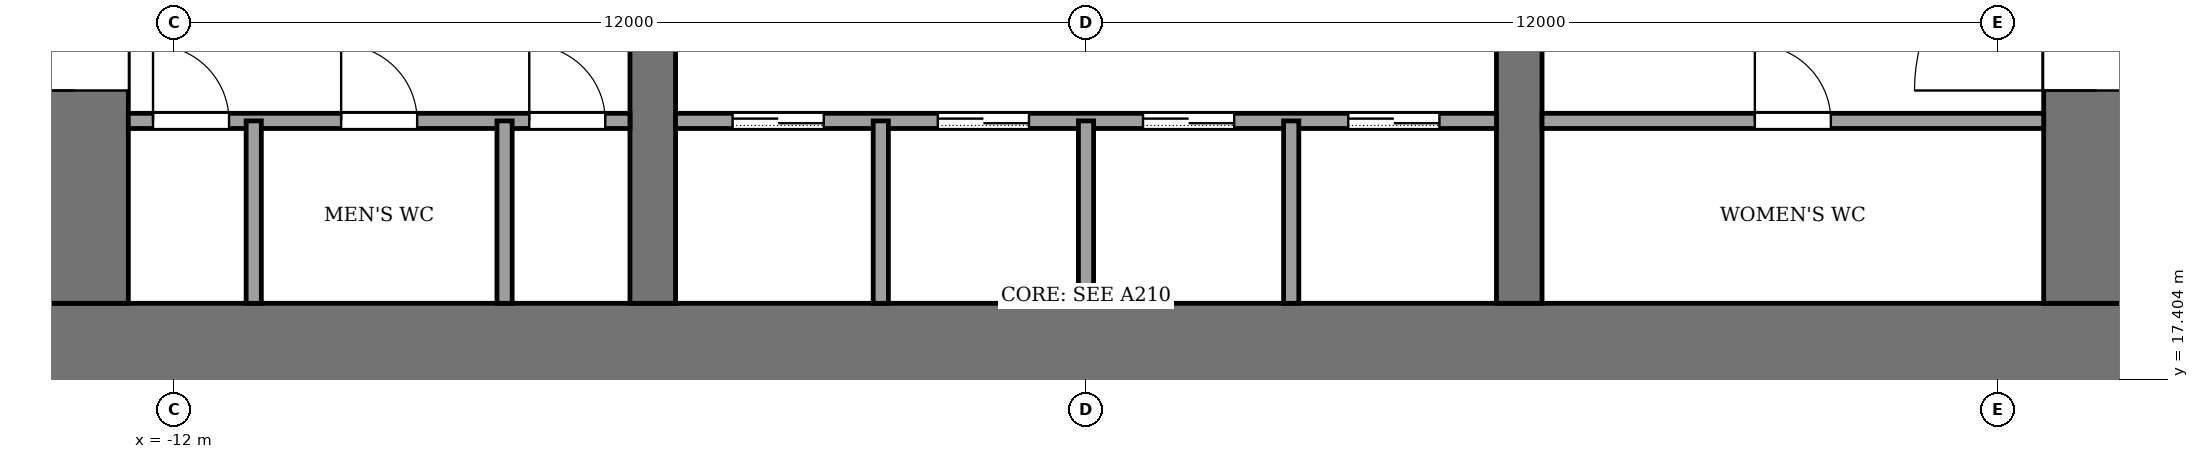
"""IFC4 building model, lengths in metres.
Left out: names, types, materials, properties, quantities, classifications, styles, units other than length and angle.
Written with IfcOpenShell. Run it as: python <this file> out.ifc"""

import sys

from ifc_helpers import new_model, si_unit, direction, frame, frame_2d, origin, place, context, subcontext, project, spatial, rectangle, extrude, element, fill, save


model = new_model("IFC4")
c1 = context("Model", 3, precision=1e-05, world=origin(), true_north=direction((0.0, 1.0)))
c2 = subcontext(c1, "Body", "Model", "MODEL_VIEW")
j1 = project(units=[si_unit("LENGTHUNIT", "METRE"), si_unit("PLANEANGLEUNIT", "RADIAN")], contexts=[c1])
p1 = place(None, origin())
s1 = spatial("IfcSite", under=j1, at=p1, CompositionType="ELEMENT")
p2 = place(p1, origin())
s2 = spatial("IfcBuilding", under=s1, at=p2, CompositionType="ELEMENT")
p3 = place(p2, frame((0.0, 0.0, 54.0)))
s3 = spatial("IfcBuildingStorey", under=s2, at=p3, CompositionType="ELEMENT", Elevation=54.0)
p4 = place(p3, frame((-14.0, 17.7, -0.13), z_axis=(0.0, 0.0, 1.0), x_axis=(1.0, 0.0, 0.0)))
e1 = element("IfcWall", 1, at=p4, inside=s3, PredefinedType="SHEAR", context=c2, shape_type="SweptSolid", body=[
    extrude(rectangle(XDim=28.0, YDim=1.4, at=frame_2d((14.0, 0.0))), origin(), (0.0, 0.0, 1.0), 3.88),
])
p5 = place(p3, frame((-13.3, 18.4, -0.13), z_axis=(0.0, 0.0, 1.0), x_axis=(0.0, 1.0, 0.0)))
e2 = element("IfcWall", 2, at=p5, inside=s3, PredefinedType="SHEAR", context=c2, shape_type="SweptSolid", body=[
    extrude(rectangle(XDim=19.2, YDim=1.4, at=frame_2d((9.6, 0.0))), origin(), (0.0, 0.0, 1.0), 3.88),
])
p6 = place(p5, frame((2.8, 0.0, 0.13)))
e3 = element("IfcOpeningElement", 3, at=p6, cuts=e2, PredefinedType="OPENING", context=c2, shape_type="SweptSolid", body=[
    extrude(rectangle(XDim=2.4, YDim=2.4, at=frame_2d((1.2, 1.2))), frame((0.0, 0.71, 0.0), z_axis=(0.0, -1.0, 0.0), x_axis=(1.0, 0.0, 0.0)), (0.0, 0.0, 1.0), 1.42),
])
p7 = place(p5, frame((13.4, 0.0, 0.13)))
e4 = element("IfcOpeningElement", 4, at=p7, cuts=e2, PredefinedType="OPENING", context=c2, shape_type="SweptSolid", body=[
    extrude(rectangle(XDim=1.4, YDim=2.2, at=frame_2d((0.7, 1.1))), frame((0.0, 0.71, 0.0), z_axis=(0.0, -1.0, 0.0), x_axis=(1.0, 0.0, 0.0)), (0.0, 0.0, 1.0), 1.42),
])
p8 = place(p3, frame((13.3, 18.4, -0.13), z_axis=(0.0, 0.0, 1.0), x_axis=(0.0, 1.0, 0.0)))
e5 = element("IfcWall", 5, at=p8, inside=s3, PredefinedType="SHEAR", context=c2, shape_type="SweptSolid", body=[
    extrude(rectangle(XDim=19.2, YDim=1.4, at=frame_2d((9.6, 0.0))), origin(), (0.0, 0.0, 1.0), 3.88),
])
p9 = place(p8, frame((2.8, 0.0, 0.13)))
e6 = element("IfcOpeningElement", 6, at=p9, cuts=e5, PredefinedType="OPENING", context=c2, shape_type="SweptSolid", body=[
    extrude(rectangle(XDim=2.4, YDim=2.4, at=frame_2d((1.2, 1.2))), frame((0.0, 0.71, 0.0), z_axis=(0.0, -1.0, 0.0), x_axis=(1.0, 0.0, 0.0)), (0.0, 0.0, 1.0), 1.42),
])
p10 = place(p8, frame((13.3, 0.0, 0.13)))
e7 = element("IfcOpeningElement", 7, at=p10, cuts=e5, PredefinedType="OPENING", context=c2, shape_type="SweptSolid", body=[
    extrude(rectangle(XDim=2.4, YDim=2.4, at=frame_2d((1.2, 1.2))), frame((0.0, 0.71, 0.0), z_axis=(0.0, -1.0, 0.0), x_axis=(1.0, 0.0, 0.0)), (0.0, 0.0, 1.0), 1.42),
])
p11 = place(p3, frame((-5.7, 18.4, -0.13), z_axis=(0.0, 0.0, 1.0), x_axis=(0.0, 1.0, 0.0)))
e8 = element("IfcWall", 8, at=p11, inside=s3, PredefinedType="SHEAR", context=c2, shape_type="SweptSolid", body=[
    extrude(rectangle(XDim=19.2, YDim=0.6, at=frame_2d((9.6, 0.0))), origin(), (0.0, 0.0, 1.0), 3.88),
])
p12 = place(p11, frame((8.35, 0.0, 0.13)))
e9 = element("IfcOpeningElement", 9, at=p12, cuts=e8, PredefinedType="OPENING", context=c2, shape_type="SweptSolid", body=[
    extrude(rectangle(XDim=0.9, YDim=2.1, at=frame_2d((0.45, 1.05))), frame((0.0, 0.31, 0.0), z_axis=(0.0, -1.0, 0.0), x_axis=(1.0, 0.0, 0.0)), (0.0, 0.0, 1.0), 0.62),
])
p13 = place(p3, frame((5.7, 18.4, -0.13), z_axis=(0.0, 0.0, 1.0), x_axis=(0.0, 1.0, 0.0)))
e10 = element("IfcWall", 10, at=p13, inside=s3, PredefinedType="SHEAR", context=c2, shape_type="SweptSolid", body=[
    extrude(rectangle(XDim=19.2, YDim=0.6, at=frame_2d((9.6, 0.0))), origin(), (0.0, 0.0, 1.0), 3.88),
])
p14 = place(p13, frame((8.35, 0.0, 0.13)))
e11 = element("IfcOpeningElement", 11, at=p14, cuts=e10, PredefinedType="OPENING", context=c2, shape_type="SweptSolid", body=[
    extrude(rectangle(XDim=0.9, YDim=2.1, at=frame_2d((0.45, 1.05))), frame((0.0, 0.31, 0.0), z_axis=(0.0, -1.0, 0.0), x_axis=(1.0, 0.0, 0.0)), (0.0, 0.0, 1.0), 0.62),
])
p15 = place(p13, frame((13.3, 0.0, 0.13)))
e12 = element("IfcOpeningElement", 12, at=p15, cuts=e10, PredefinedType="OPENING", context=c2, shape_type="SweptSolid", body=[
    extrude(rectangle(XDim=2.4, YDim=2.4, at=frame_2d((1.2, 1.2))), frame((0.0, 0.31, 0.0), z_axis=(0.0, -1.0, 0.0), x_axis=(1.0, 0.0, 0.0)), (0.0, 0.0, 1.0), 0.62),
])
p16 = place(p3, frame((-12.6, 20.8, 0.0), z_axis=(0.0, 0.0, 1.0), x_axis=(1.0, 0.0, 0.0)))
e13 = element("IfcWall", 13, at=p16, inside=s3, PredefinedType="PARTITIONING", context=c2, shape_type="SweptSolid", body=[
    extrude(rectangle(XDim=6.6, YDim=0.2, at=frame_2d((3.3, 0.0))), origin(), (0.0, 0.0, 1.0), 3.75),
])
p17 = place(p16, frame((0.325, 0.0, 0.0)))
e14 = element("IfcOpeningElement", 14, at=p17, cuts=e13, PredefinedType="OPENING", context=c2, shape_type="SweptSolid", body=[
    extrude(rectangle(XDim=1.0, YDim=2.1, at=frame_2d((0.5, 1.05))), frame((0.0, 0.11, 0.0), z_axis=(0.0, -1.0, 0.0), x_axis=(1.0, 0.0, 0.0)), (0.0, 0.0, 1.0), 0.22),
])
p18 = place(p16, frame((2.8, 0.0, 0.0)))
e15 = element("IfcOpeningElement", 15, at=p18, cuts=e13, PredefinedType="OPENING", context=c2, shape_type="SweptSolid", body=[
    extrude(rectangle(XDim=1.0, YDim=2.1, at=frame_2d((0.5, 1.05))), frame((0.0, 0.11, 0.0), z_axis=(0.0, -1.0, 0.0), x_axis=(1.0, 0.0, 0.0)), (0.0, 0.0, 1.0), 0.22),
])
p19 = place(p16, frame((5.275, 0.0, 0.0)))
e16 = element("IfcOpeningElement", 16, at=p19, cuts=e13, PredefinedType="OPENING", context=c2, shape_type="SweptSolid", body=[
    extrude(rectangle(XDim=1.0, YDim=2.1, at=frame_2d((0.5, 1.05))), frame((0.0, 0.11, 0.0), z_axis=(0.0, -1.0, 0.0), x_axis=(1.0, 0.0, 0.0)), (0.0, 0.0, 1.0), 0.22),
])
p20 = place(p3, frame((-5.4, 20.8, 0.0), z_axis=(0.0, 0.0, 1.0), x_axis=(1.0, 0.0, 0.0)))
e17 = element("IfcWall", 17, at=p20, inside=s3, PredefinedType="PARTITIONING", context=c2, shape_type="SweptSolid", body=[
    extrude(rectangle(XDim=10.8, YDim=0.2, at=frame_2d((5.4, 0.0))), origin(), (0.0, 0.0, 1.0), 3.75),
])
p21 = place(p20, frame((0.75, 0.0, 0.0)))
e18 = element("IfcOpeningElement", 18, at=p21, cuts=e17, PredefinedType="OPENING", context=c2, shape_type="SweptSolid", body=[
    extrude(rectangle(XDim=1.2, YDim=2.2, at=frame_2d((0.6, 1.1))), frame((0.0, 0.11, 0.0), z_axis=(0.0, -1.0, 0.0), x_axis=(1.0, 0.0, 0.0)), (0.0, 0.0, 1.0), 0.22),
])
p22 = place(p20, frame((3.45, 0.0, 0.0)))
e19 = element("IfcOpeningElement", 19, at=p22, cuts=e17, PredefinedType="OPENING", context=c2, shape_type="SweptSolid", body=[
    extrude(rectangle(XDim=1.2, YDim=2.2, at=frame_2d((0.6, 1.1))), frame((0.0, 0.11, 0.0), z_axis=(0.0, -1.0, 0.0), x_axis=(1.0, 0.0, 0.0)), (0.0, 0.0, 1.0), 0.22),
])
p23 = place(p20, frame((6.15, 0.0, 0.0)))
e20 = element("IfcOpeningElement", 20, at=p23, cuts=e17, PredefinedType="OPENING", context=c2, shape_type="SweptSolid", body=[
    extrude(rectangle(XDim=1.2, YDim=2.2, at=frame_2d((0.6, 1.1))), frame((0.0, 0.11, 0.0), z_axis=(0.0, -1.0, 0.0), x_axis=(1.0, 0.0, 0.0)), (0.0, 0.0, 1.0), 0.22),
])
p24 = place(p20, frame((8.85, 0.0, 0.0)))
e21 = element("IfcOpeningElement", 21, at=p24, cuts=e17, PredefinedType="OPENING", context=c2, shape_type="SweptSolid", body=[
    extrude(rectangle(XDim=1.2, YDim=2.2, at=frame_2d((0.6, 1.1))), frame((0.0, 0.11, 0.0), z_axis=(0.0, -1.0, 0.0), x_axis=(1.0, 0.0, 0.0)), (0.0, 0.0, 1.0), 0.22),
])
p25 = place(p3, frame((6.0, 20.8, 0.0), z_axis=(0.0, 0.0, 1.0), x_axis=(1.0, 0.0, 0.0)))
e22 = element("IfcWall", 22, at=p25, inside=s3, PredefinedType="PARTITIONING", context=c2, shape_type="SweptSolid", body=[
    extrude(rectangle(XDim=6.6, YDim=0.2, at=frame_2d((3.3, 0.0))), origin(), (0.0, 0.0, 1.0), 3.75),
])
p26 = place(p25, frame((2.8, 0.0, 0.0)))
e23 = element("IfcOpeningElement", 23, at=p26, cuts=e22, PredefinedType="OPENING", context=c2, shape_type="SweptSolid", body=[
    extrude(rectangle(XDim=1.0, YDim=2.1, at=frame_2d((0.5, 1.05))), frame((0.0, 0.11, 0.0), z_axis=(0.0, -1.0, 0.0), x_axis=(1.0, 0.0, 0.0)), (0.0, 0.0, 1.0), 0.22),
])
for number, where, z_axis, x_axis in (
    (24, (-10.95, 18.4, 0.0), (0.0, 0.0, 1.0), (0.0, 1.0, 0.0)),
    (25, (-7.65, 18.4, 0.0), (0.0, 0.0, 1.0), (0.0, 1.0, 0.0)),
    (26, (-2.7, 18.4, 0.0), (0.0, 0.0, 1.0), (0.0, 1.0, 0.0)),
    (27, (0.0, 18.4, 0.0), (0.0, 0.0, 1.0), (0.0, 1.0, 0.0)),
    (28, (2.7, 18.4, 0.0), (0.0, 0.0, 1.0), (0.0, 1.0, 0.0)),
):
    element("IfcWall", number, at=place(p3, frame(where, z_axis=z_axis, x_axis=x_axis)), inside=s3, PredefinedType="PARTITIONING", context=c2, shape_type="SweptSolid", body=[
        extrude(rectangle(XDim=2.4, YDim=0.2, at=frame_2d((1.2, 0.0))), origin(), (0.0, 0.0, 1.0), 3.75),
    ])
p27 = place(p21, origin())
e29 = element("IfcDoor", 29, at=p27, inside=s3, OperationType="SLIDING_TO_LEFT", PredefinedType="DOOR", context=c2, shape_type="SweptSolid", body=[
    extrude(rectangle(XDim=1.2, YDim=2.2, at=frame_2d((0.6, 1.1))), frame((0.0, 0.025, 0.0), z_axis=(0.0, -1.0, 0.0), x_axis=(1.0, 0.0, 0.0)), (0.0, 0.0, 1.0), 0.05),
])
fill(e18, e29)
p28 = place(p22, origin())
e30 = element("IfcDoor", 30, at=p28, inside=s3, OperationType="SLIDING_TO_LEFT", PredefinedType="DOOR", context=c2, shape_type="SweptSolid", body=[
    extrude(rectangle(XDim=1.2, YDim=2.2, at=frame_2d((0.6, 1.1))), frame((0.0, 0.025, 0.0), z_axis=(0.0, -1.0, 0.0), x_axis=(1.0, 0.0, 0.0)), (0.0, 0.0, 1.0), 0.05),
])
fill(e19, e30)
p29 = place(p23, origin())
e31 = element("IfcDoor", 31, at=p29, inside=s3, OperationType="SLIDING_TO_LEFT", PredefinedType="DOOR", context=c2, shape_type="SweptSolid", body=[
    extrude(rectangle(XDim=1.2, YDim=2.2, at=frame_2d((0.6, 1.1))), frame((0.0, 0.025, 0.0), z_axis=(0.0, -1.0, 0.0), x_axis=(1.0, 0.0, 0.0)), (0.0, 0.0, 1.0), 0.05),
])
fill(e20, e31)
p30 = place(p24, origin())
e32 = element("IfcDoor", 32, at=p30, inside=s3, OperationType="SLIDING_TO_LEFT", PredefinedType="DOOR", context=c2, shape_type="SweptSolid", body=[
    extrude(rectangle(XDim=1.2, YDim=2.2, at=frame_2d((0.6, 1.1))), frame((0.0, 0.025, 0.0), z_axis=(0.0, -1.0, 0.0), x_axis=(1.0, 0.0, 0.0)), (0.0, 0.0, 1.0), 0.05),
])
fill(e21, e32)
p31 = place(p17, origin())
e33 = element("IfcDoor", 33, at=p31, inside=s3, OperationType="SINGLE_SWING_RIGHT", PredefinedType="DOOR", context=c2, shape_type="SweptSolid", body=[
    extrude(rectangle(XDim=1.0, YDim=2.1, at=frame_2d((0.5, 1.05))), frame((0.0, 0.025, 0.0), z_axis=(0.0, -1.0, 0.0), x_axis=(1.0, 0.0, 0.0)), (0.0, 0.0, 1.0), 0.05),
])
fill(e14, e33)
p32 = place(p18, origin())
e34 = element("IfcDoor", 34, at=p32, inside=s3, OperationType="SINGLE_SWING_RIGHT", PredefinedType="DOOR", context=c2, shape_type="SweptSolid", body=[
    extrude(rectangle(XDim=1.0, YDim=2.1, at=frame_2d((0.5, 1.05))), frame((0.0, 0.025, 0.0), z_axis=(0.0, -1.0, 0.0), x_axis=(1.0, 0.0, 0.0)), (0.0, 0.0, 1.0), 0.05),
])
fill(e15, e34)
p33 = place(p19, origin())
e35 = element("IfcDoor", 35, at=p33, inside=s3, OperationType="SINGLE_SWING_RIGHT", PredefinedType="DOOR", context=c2, shape_type="SweptSolid", body=[
    extrude(rectangle(XDim=1.0, YDim=2.1, at=frame_2d((0.5, 1.05))), frame((0.0, 0.025, 0.0), z_axis=(0.0, -1.0, 0.0), x_axis=(1.0, 0.0, 0.0)), (0.0, 0.0, 1.0), 0.05),
])
fill(e16, e35)
p34 = place(p26, origin())
e36 = element("IfcDoor", 36, at=p34, inside=s3, OperationType="SINGLE_SWING_RIGHT", PredefinedType="DOOR", context=c2, shape_type="SweptSolid", body=[
    extrude(rectangle(XDim=1.0, YDim=2.1, at=frame_2d((0.5, 1.05))), frame((0.0, 0.025, 0.0), z_axis=(0.0, -1.0, 0.0), x_axis=(1.0, 0.0, 0.0)), (0.0, 0.0, 1.0), 0.05),
])
fill(e23, e36)
p35 = place(p6, origin())
e37 = element("IfcDoor", 37, at=p35, inside=s3, OperationType="DOUBLE_DOOR_SINGLE_SWING", PredefinedType="DOOR", context=c2, shape_type="SweptSolid", body=[
    extrude(rectangle(XDim=2.4, YDim=2.4, at=frame_2d((1.2, 1.2))), frame((0.0, 0.025, 0.0), z_axis=(0.0, -1.0, 0.0), x_axis=(1.0, 0.0, 0.0)), (0.0, 0.0, 1.0), 0.05),
])
fill(e3, e37)
p36 = place(p9, origin())
e38 = element("IfcDoor", 38, at=p36, inside=s3, OperationType="DOUBLE_DOOR_SINGLE_SWING", PredefinedType="DOOR", context=c2, shape_type="SweptSolid", body=[
    extrude(rectangle(XDim=2.4, YDim=2.4, at=frame_2d((1.2, 1.2))), frame((0.0, 0.025, 0.0), z_axis=(0.0, -1.0, 0.0), x_axis=(1.0, 0.0, 0.0)), (0.0, 0.0, 1.0), 0.05),
])
fill(e6, e38)
save(model, sys.argv[1])
